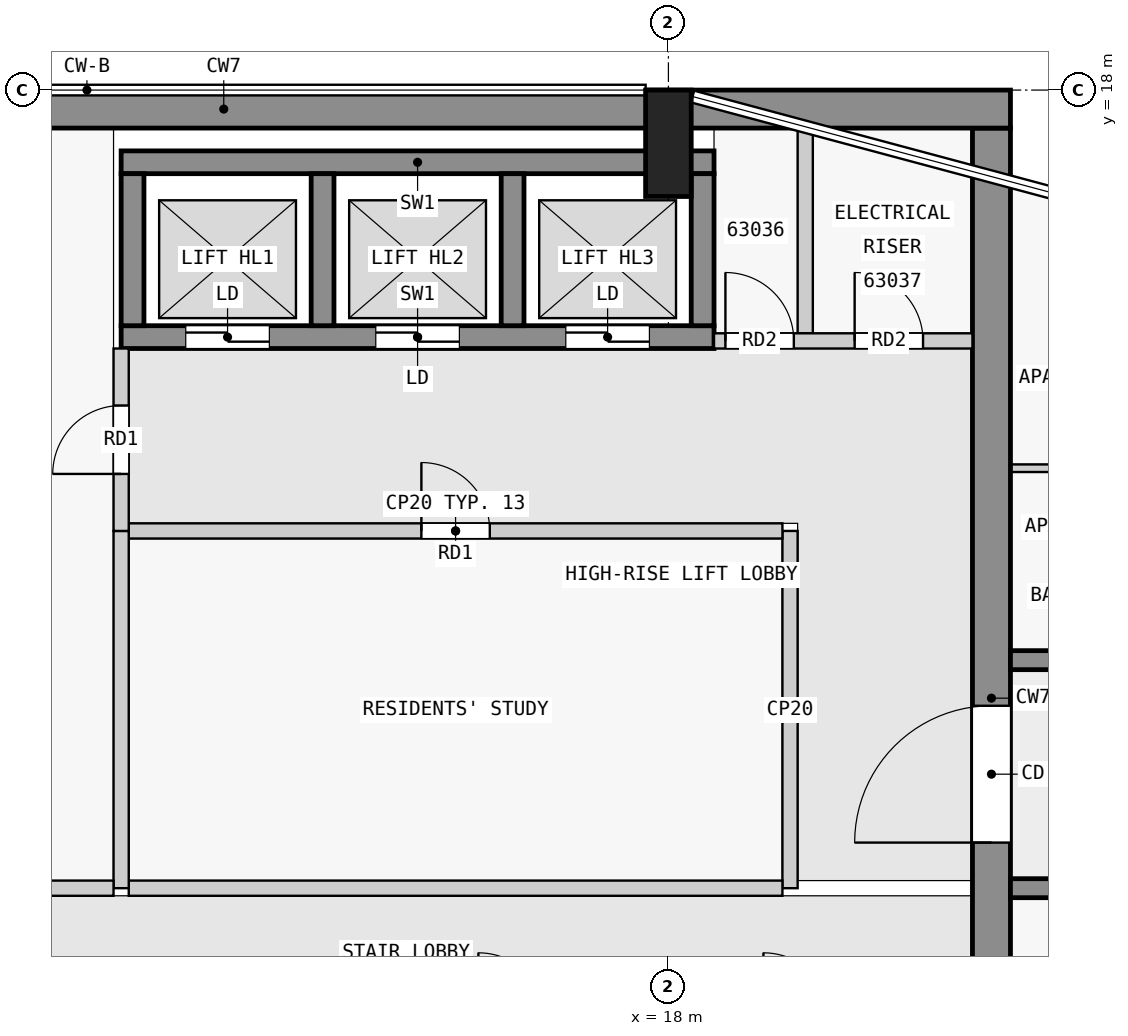
"""IFC4 building model, lengths in metres.
Left out: names, types, materials, properties, quantities, classifications, styles, units other than length and angle.
Written with IfcOpenShell. Run it as: python <this file> out.ifc"""

import sys

from ifc_helpers import new_model, si_unit, direction, frame, frame_2d, origin, origin_2d, place, context, subcontext, project, spatial, rectangle, extrude, element, fill, save


model = new_model("IFC4")
c1 = context("Model", 3, precision=1e-05, world=origin(), true_north=direction((0.0, 1.0)))
c2 = subcontext(c1, "Body", "Model", "MODEL_VIEW")
j1 = project(units=[si_unit("LENGTHUNIT", "METRE"), si_unit("PLANEANGLEUNIT", "RADIAN")], contexts=[c1])
p1 = place(None, origin())
s1 = spatial("IfcSite", under=j1, at=p1, CompositionType="ELEMENT")
p2 = place(p1, origin())
s2 = spatial("IfcBuilding", under=s1, at=p2, CompositionType="ELEMENT")
p3 = place(p2, frame((0.0, 0.0, 242.4)))
s3 = spatial("IfcBuildingStorey", under=s2, at=p3, CompositionType="ELEMENT", Elevation=242.4)
p4 = place(p3, frame((18.0, 17.3, 0.0), z_axis=(0.0, 0.0, 1.0), x_axis=(1.0, 0.0, 0.0)))
e1 = element("IfcColumn", 1, at=p4, inside=s3, PredefinedType="COLUMN", context=c2, shape_type="SweptSolid", body=[
    extrude(rectangle(XDim=0.6, YDim=1.4, at=origin_2d()), origin(), (0.0, 0.0, 1.0), 3.5),
])
p5 = place(p3, frame((1.8, 17.75, 0.0), z_axis=(0.0, 0.0, 1.0), x_axis=(1.0, 0.0, 0.0)))
e2 = element("IfcWall", 2, at=p5, inside=s3, PredefinedType="SHEAR", context=c2, shape_type="SweptSolid", body=[
    extrude(rectangle(XDim=20.7, YDim=0.5, at=frame_2d((10.35, 0.0))), origin(), (0.0, 0.0, 1.0), 3.25),
])
p6 = place(p3, frame((22.25, 2.5, 0.0), z_axis=(0.0, 0.0, 1.0), x_axis=(0.0, 1.0, 0.0)))
e3 = element("IfcWall", 3, at=p6, inside=s3, PredefinedType="SHEAR", context=c2, shape_type="SweptSolid", body=[
    extrude(rectangle(XDim=15.0, YDim=0.5, at=frame_2d((7.5, 0.0))), origin(), (0.0, 0.0, 1.0), 3.25),
])
p7 = place(p6, frame((5.6, 0.0, 0.0)))
e4 = element("IfcOpeningElement", 4, at=p7, cuts=e3, PredefinedType="OPENING", context=c2, shape_type="SweptSolid", body=[
    extrude(rectangle(XDim=1.8, YDim=2.1, at=frame_2d((0.9, 1.05))), frame((0.0, 0.26, 0.0), z_axis=(0.0, -1.0, 0.0), x_axis=(1.0, 0.0, 0.0)), (0.0, 0.0, 1.0), 0.52),
])
p8 = place(p3, frame((10.8, 17.05, 0.0), z_axis=(0.0, 0.0, 1.0), x_axis=(1.0, 0.0, 0.0)))
e5 = element("IfcWall", 5, at=p8, inside=s3, PredefinedType="SHEAR", context=c2, shape_type="SweptSolid", body=[
    extrude(rectangle(XDim=7.8, YDim=0.3, at=frame_2d((3.9, 0.0))), origin(), (0.0, 0.0, 1.0), 3.25),
])
p9 = place(p3, frame((10.8, 14.75, 0.0), z_axis=(0.0, 0.0, 1.0), x_axis=(1.0, 0.0, 0.0)))
e6 = element("IfcWall", 6, at=p9, inside=s3, PredefinedType="SHEAR", context=c2, shape_type="SweptSolid", body=[
    extrude(rectangle(XDim=7.8, YDim=0.3, at=frame_2d((3.9, 0.0))), origin(), (0.0, 0.0, 1.0), 3.25),
])
p10 = place(p9, frame((0.85, 0.0, 0.0)))
e7 = element("IfcOpeningElement", 7, at=p10, cuts=e6, PredefinedType="OPENING", context=c2, shape_type="SweptSolid", body=[
    extrude(rectangle(XDim=1.1, YDim=2.1, at=frame_2d((0.55, 1.05))), frame((0.0, 0.16, 0.0), z_axis=(0.0, -1.0, 0.0), x_axis=(1.0, 0.0, 0.0)), (0.0, 0.0, 1.0), 0.32),
])
p11 = place(p9, frame((3.35, 0.0, 0.0)))
e8 = element("IfcOpeningElement", 8, at=p11, cuts=e6, PredefinedType="OPENING", context=c2, shape_type="SweptSolid", body=[
    extrude(rectangle(XDim=1.1, YDim=2.1, at=frame_2d((0.55, 1.05))), frame((0.0, 0.16, 0.0), z_axis=(0.0, -1.0, 0.0), x_axis=(1.0, 0.0, 0.0)), (0.0, 0.0, 1.0), 0.32),
])
p12 = place(p9, frame((5.85, 0.0, 0.0)))
e9 = element("IfcOpeningElement", 9, at=p12, cuts=e6, PredefinedType="OPENING", context=c2, shape_type="SweptSolid", body=[
    extrude(rectangle(XDim=1.1, YDim=2.1, at=frame_2d((0.55, 1.05))), frame((0.0, 0.16, 0.0), z_axis=(0.0, -1.0, 0.0), x_axis=(1.0, 0.0, 0.0)), (0.0, 0.0, 1.0), 0.32),
])
for number, where, z_axis, x_axis in (
    (10, (10.95, 14.9, 0.0), (0.0, 0.0, 1.0), (0.0, 1.0, 0.0)),
    (11, (13.45, 14.9, 0.0), (0.0, 0.0, 1.0), (0.0, 1.0, 0.0)),
    (12, (15.95, 14.9, 0.0), (0.0, 0.0, 1.0), (0.0, 1.0, 0.0)),
    (13, (18.45, 14.9, 0.0), (0.0, 0.0, 1.0), (0.0, 1.0, 0.0)),
):
    element("IfcWall", number, at=place(p3, frame(where, z_axis=z_axis, x_axis=x_axis)), inside=s3, PredefinedType="SHEAR", context=c2, shape_type="SweptSolid", body=[
        extrude(rectangle(XDim=2.0, YDim=0.3, at=frame_2d((1.0, 0.0))), origin(), (0.0, 0.0, 1.0), 3.25),
    ])
p13 = place(p3, frame((22.5, 7.5, 0.0), z_axis=(0.0, 0.0, 1.0), x_axis=(1.0, 0.0, 0.0)))
e14 = element("IfcWall", 14, at=p13, inside=s3, PredefinedType="SHEAR", context=c2, shape_type="SweptSolid", body=[
    extrude(rectangle(XDim=22.5, YDim=0.25, at=frame_2d((11.25, 0.0))), origin(), (0.0, 0.0, 1.0), 3.25),
])
p14 = place(p13, frame((1.75, 0.0, 0.0)))
e15 = element("IfcOpeningElement", 15, at=p14, cuts=e14, PredefinedType="OPENING", context=c2, shape_type="SweptSolid", body=[
    extrude(rectangle(XDim=1.0, YDim=2.1, at=frame_2d((0.5, 1.05))), frame((0.0, 0.135, 0.0), z_axis=(0.0, -1.0, 0.0), x_axis=(1.0, 0.0, 0.0)), (0.0, 0.0, 1.0), 0.27),
])
p15 = place(p13, frame((5.85, 0.0, 0.0)))
e16 = element("IfcOpeningElement", 16, at=p15, cuts=e14, PredefinedType="OPENING", context=c2, shape_type="SweptSolid", body=[
    extrude(rectangle(XDim=1.8, YDim=2.1, at=frame_2d((0.9, 1.05))), frame((0.0, 0.135, 0.0), z_axis=(0.0, -1.0, 0.0), x_axis=(1.0, 0.0, 0.0)), (0.0, 0.0, 1.0), 0.27),
])
p16 = place(p13, frame((13.05, 0.0, 0.0)))
e17 = element("IfcOpeningElement", 17, at=p16, cuts=e14, PredefinedType="OPENING", context=c2, shape_type="SweptSolid", body=[
    extrude(rectangle(XDim=1.0, YDim=2.1, at=frame_2d((0.5, 1.05))), frame((0.0, 0.135, 0.0), z_axis=(0.0, -1.0, 0.0), x_axis=(1.0, 0.0, 0.0)), (0.0, 0.0, 1.0), 0.27),
])
p17 = place(p13, frame((18.75, 0.0, 0.0)))
e18 = element("IfcOpeningElement", 18, at=p17, cuts=e14, PredefinedType="OPENING", context=c2, shape_type="SweptSolid", body=[
    extrude(rectangle(XDim=0.9, YDim=2.1, at=frame_2d((0.45, 1.05))), frame((0.0, 0.135, 0.0), z_axis=(0.0, -1.0, 0.0), x_axis=(1.0, 0.0, 0.0)), (0.0, 0.0, 1.0), 0.27),
])
p18 = place(p13, frame((20.95, 0.0, 0.0)))
e19 = element("IfcOpeningElement", 19, at=p18, cuts=e14, PredefinedType="OPENING", context=c2, shape_type="SweptSolid", body=[
    extrude(rectangle(XDim=1.0, YDim=2.1, at=frame_2d((0.5, 1.05))), frame((0.0, 0.135, 0.0), z_axis=(0.0, -1.0, 0.0), x_axis=(1.0, 0.0, 0.0)), (0.0, 0.0, 1.0), 0.27),
])
p19 = place(p3, frame((22.5, 10.5, 0.0), z_axis=(0.0, 0.0, 1.0), x_axis=(1.0, 0.0, 0.0)))
e20 = element("IfcWall", 20, at=p19, inside=s3, PredefinedType="SHEAR", context=c2, shape_type="SweptSolid", body=[
    extrude(rectangle(XDim=22.5, YDim=0.25, at=frame_2d((11.25, 0.0))), origin(), (0.0, 0.0, 1.0), 3.25),
])
p20 = place(p19, frame((4.05, 0.0, 0.0)))
e21 = element("IfcOpeningElement", 21, at=p20, cuts=e20, PredefinedType="OPENING", context=c2, shape_type="SweptSolid", body=[
    extrude(rectangle(XDim=1.0, YDim=2.1, at=frame_2d((0.5, 1.05))), frame((0.0, 0.135, 0.0), z_axis=(0.0, -1.0, 0.0), x_axis=(1.0, 0.0, 0.0)), (0.0, 0.0, 1.0), 0.27),
])
p21 = place(p19, frame((10.75, 0.0, 0.0)))
e22 = element("IfcOpeningElement", 22, at=p21, cuts=e20, PredefinedType="OPENING", context=c2, shape_type="SweptSolid", body=[
    extrude(rectangle(XDim=1.0, YDim=2.1, at=frame_2d((0.5, 1.05))), frame((0.0, 0.135, 0.0), z_axis=(0.0, -1.0, 0.0), x_axis=(1.0, 0.0, 0.0)), (0.0, 0.0, 1.0), 0.27),
])
p22 = place(p19, frame((16.85, 0.0, 0.0)))
e23 = element("IfcOpeningElement", 23, at=p22, cuts=e20, PredefinedType="OPENING", context=c2, shape_type="SweptSolid", body=[
    extrude(rectangle(XDim=1.0, YDim=2.1, at=frame_2d((0.5, 1.05))), frame((0.0, 0.135, 0.0), z_axis=(0.0, -1.0, 0.0), x_axis=(1.0, 0.0, 0.0)), (0.0, 0.0, 1.0), 0.27),
])
p23 = place(p3, frame((7.1, 7.5, 0.0), z_axis=(0.0, 0.0, 1.0), x_axis=(1.0, 0.0, 0.0)))
e24 = element("IfcWall", 24, at=p23, inside=s3, PredefinedType="PARTITIONING", context=c2, shape_type="SweptSolid", body=[
    extrude(rectangle(XDim=3.6, YDim=0.2, at=frame_2d((1.8, 0.0))), origin(), (0.0, 0.0, 1.0), 3.25),
])
p24 = place(p3, frame((10.8, 12.2, 0.0), z_axis=(0.0, 0.0, 1.0), x_axis=(0.0, 1.0, 0.0)))
e25 = element("IfcWall", 25, at=p24, inside=s3, PredefinedType="PARTITIONING", context=c2, shape_type="SweptSolid", body=[
    extrude(rectangle(XDim=2.4, YDim=0.2, at=frame_2d((1.2, 0.0))), origin(), (0.0, 0.0, 1.0), 3.25),
])
p25 = place(p24, frame((0.75, 0.0, 0.0)))
e26 = element("IfcOpeningElement", 26, at=p25, cuts=e25, PredefinedType="OPENING", context=c2, shape_type="SweptSolid", body=[
    extrude(rectangle(XDim=0.9, YDim=2.1, at=frame_2d((0.45, 1.05))), frame((0.0, 0.11, 0.0), z_axis=(0.0, -1.0, 0.0), x_axis=(1.0, 0.0, 0.0)), (0.0, 0.0, 1.0), 0.22),
])
p26 = place(p3, frame((10.8, 7.5, 0.0), z_axis=(0.0, 0.0, 1.0), x_axis=(0.0, 1.0, 0.0)))
e27 = element("IfcWall", 27, at=p26, inside=s3, PredefinedType="PARTITIONING", context=c2, shape_type="SweptSolid", body=[
    extrude(rectangle(XDim=4.7, YDim=0.2, at=frame_2d((2.35, 0.0))), origin(), (0.0, 0.0, 1.0), 3.25),
])
p27 = place(p3, frame((10.9, 7.5, 0.0), z_axis=(0.0, 0.0, 1.0), x_axis=(1.0, 0.0, 0.0)))
e28 = element("IfcWall", 28, at=p27, inside=s3, PredefinedType="PARTITIONING", context=c2, shape_type="SweptSolid", body=[
    extrude(rectangle(XDim=8.6, YDim=0.2, at=frame_2d((4.3, 0.0))), origin(), (0.0, 0.0, 1.0), 3.25),
])
p28 = place(p3, frame((19.6, 7.5, 0.0), z_axis=(0.0, 0.0, 1.0), x_axis=(0.0, 1.0, 0.0)))
e29 = element("IfcWall", 29, at=p28, inside=s3, PredefinedType="PARTITIONING", context=c2, shape_type="SweptSolid", body=[
    extrude(rectangle(XDim=4.7, YDim=0.2, at=frame_2d((2.35, 0.0))), origin(), (0.0, 0.0, 1.0), 3.25),
])
p29 = place(p3, frame((10.9, 12.2, 0.0), z_axis=(0.0, 0.0, 1.0), x_axis=(1.0, 0.0, 0.0)))
e30 = element("IfcWall", 30, at=p29, inside=s3, PredefinedType="PARTITIONING", context=c2, shape_type="SweptSolid", body=[
    extrude(rectangle(XDim=8.6, YDim=0.2, at=frame_2d((4.3, 0.0))), origin(), (0.0, 0.0, 1.0), 3.25),
])
p30 = place(p29, frame((3.85, 0.0, 0.0)))
e31 = element("IfcOpeningElement", 31, at=p30, cuts=e30, PredefinedType="OPENING", context=c2, shape_type="SweptSolid", body=[
    extrude(rectangle(XDim=0.9, YDim=2.1, at=frame_2d((0.45, 1.05))), frame((0.0, 0.11, 0.0), z_axis=(0.0, -1.0, 0.0), x_axis=(1.0, 0.0, 0.0)), (0.0, 0.0, 1.0), 0.22),
])
p31 = place(p3, frame((18.6, 14.7, 0.0), z_axis=(0.0, 0.0, 1.0), x_axis=(1.0, 0.0, 0.0)))
e32 = element("IfcWall", 32, at=p31, inside=s3, PredefinedType="PARTITIONING", context=c2, shape_type="SweptSolid", body=[
    extrude(rectangle(XDim=3.4, YDim=0.2, at=frame_2d((1.7, 0.0))), origin(), (0.0, 0.0, 1.0), 3.25),
])
p32 = place(p31, frame((0.15, 0.0, 0.0)))
e33 = element("IfcOpeningElement", 33, at=p32, cuts=e32, PredefinedType="OPENING", context=c2, shape_type="SweptSolid", body=[
    extrude(rectangle(XDim=0.9, YDim=2.1, at=frame_2d((0.45, 1.05))), frame((0.0, 0.11, 0.0), z_axis=(0.0, -1.0, 0.0), x_axis=(1.0, 0.0, 0.0)), (0.0, 0.0, 1.0), 0.22),
])
p33 = place(p31, frame((1.85, 0.0, 0.0)))
e34 = element("IfcOpeningElement", 34, at=p33, cuts=e32, PredefinedType="OPENING", context=c2, shape_type="SweptSolid", body=[
    extrude(rectangle(XDim=0.9, YDim=2.1, at=frame_2d((0.45, 1.05))), frame((0.0, 0.11, 0.0), z_axis=(0.0, -1.0, 0.0), x_axis=(1.0, 0.0, 0.0)), (0.0, 0.0, 1.0), 0.22),
])
p34 = place(p3, frame((19.8, 14.8, 0.0), z_axis=(0.0, 0.0, 1.0), x_axis=(0.0, 1.0, 0.0)))
e35 = element("IfcWall", 35, at=p34, inside=s3, PredefinedType="PARTITIONING", context=c2, shape_type="SweptSolid", body=[
    extrude(rectangle(XDim=2.7, YDim=0.2, at=frame_2d((1.35, 0.0))), origin(), (0.0, 0.0, 1.0), 3.25),
])
p35 = place(p3, frame((24.25, 13.025, 0.0), z_axis=(0.0, 0.0, 1.0), x_axis=(-1.0, 0.0, 0.0)))
e36 = element("IfcWall", 36, at=p35, inside=s3, PredefinedType="PARTITIONING", context=c2, shape_type="SweptSolid", body=[
    extrude(rectangle(XDim=1.75, YDim=0.1, at=frame_2d((0.875, 0.0))), origin(), (0.0, 0.0, 1.0), 3.25),
])
p36 = place(p25, origin())
e37 = element("IfcDoor", 37, at=p36, inside=s3, OperationType="SINGLE_SWING_LEFT", PredefinedType="DOOR", context=c2, shape_type="SweptSolid", body=[
    extrude(rectangle(XDim=0.9, YDim=2.1, at=frame_2d((0.45, 1.05))), frame((0.0, 0.025, 0.0), z_axis=(0.0, -1.0, 0.0), x_axis=(1.0, 0.0, 0.0)), (0.0, 0.0, 1.0), 0.05),
])
fill(e26, e37)
p37 = place(p30, origin())
e38 = element("IfcDoor", 38, at=p37, inside=s3, OperationType="SINGLE_SWING_LEFT", PredefinedType="DOOR", context=c2, shape_type="SweptSolid", body=[
    extrude(rectangle(XDim=0.9, YDim=2.1, at=frame_2d((0.45, 1.05))), frame((0.0, 0.025, 0.0), z_axis=(0.0, -1.0, 0.0), x_axis=(1.0, 0.0, 0.0)), (0.0, 0.0, 1.0), 0.05),
])
fill(e31, e38)
p38 = place(p10, origin())
e39 = element("IfcDoor", 39, at=p38, inside=s3, OperationType="DOUBLE_DOOR_SLIDING", PredefinedType="DOOR", context=c2, shape_type="SweptSolid", body=[
    extrude(rectangle(XDim=1.1, YDim=2.1, at=frame_2d((0.55, 1.05))), frame((0.0, 0.025, 0.0), z_axis=(0.0, -1.0, 0.0), x_axis=(1.0, 0.0, 0.0)), (0.0, 0.0, 1.0), 0.05),
])
fill(e7, e39)
p39 = place(p11, origin())
e40 = element("IfcDoor", 40, at=p39, inside=s3, OperationType="DOUBLE_DOOR_SLIDING", PredefinedType="DOOR", context=c2, shape_type="SweptSolid", body=[
    extrude(rectangle(XDim=1.1, YDim=2.1, at=frame_2d((0.55, 1.05))), frame((0.0, 0.025, 0.0), z_axis=(0.0, -1.0, 0.0), x_axis=(1.0, 0.0, 0.0)), (0.0, 0.0, 1.0), 0.05),
])
fill(e8, e40)
p40 = place(p12, origin())
e41 = element("IfcDoor", 41, at=p40, inside=s3, OperationType="DOUBLE_DOOR_SLIDING", PredefinedType="DOOR", context=c2, shape_type="SweptSolid", body=[
    extrude(rectangle(XDim=1.1, YDim=2.1, at=frame_2d((0.55, 1.05))), frame((0.0, 0.025, 0.0), z_axis=(0.0, -1.0, 0.0), x_axis=(1.0, 0.0, 0.0)), (0.0, 0.0, 1.0), 0.05),
])
fill(e9, e41)
p41 = place(p7, origin())
e42 = element("IfcDoor", 42, at=p41, inside=s3, OperationType="DOUBLE_DOOR_SINGLE_SWING", PredefinedType="DOOR", context=c2, shape_type="SweptSolid", body=[
    extrude(rectangle(XDim=1.8, YDim=2.1, at=frame_2d((0.9, 1.05))), frame((0.0, 0.025, 0.0), z_axis=(0.0, -1.0, 0.0), x_axis=(1.0, 0.0, 0.0)), (0.0, 0.0, 1.0), 0.05),
])
fill(e4, e42)
p42 = place(p32, origin())
e43 = element("IfcDoor", 43, at=p42, inside=s3, OperationType="SINGLE_SWING_LEFT", PredefinedType="DOOR", context=c2, shape_type="SweptSolid", body=[
    extrude(rectangle(XDim=0.9, YDim=2.1, at=frame_2d((0.45, 1.05))), frame((0.0, 0.025, 0.0), z_axis=(0.0, -1.0, 0.0), x_axis=(1.0, 0.0, 0.0)), (0.0, 0.0, 1.0), 0.05),
])
fill(e33, e43)
p43 = place(p33, origin())
e44 = element("IfcDoor", 44, at=p43, inside=s3, OperationType="SINGLE_SWING_LEFT", PredefinedType="DOOR", context=c2, shape_type="SweptSolid", body=[
    extrude(rectangle(XDim=0.9, YDim=2.1, at=frame_2d((0.45, 1.05))), frame((0.0, 0.025, 0.0), z_axis=(0.0, -1.0, 0.0), x_axis=(1.0, 0.0, 0.0)), (0.0, 0.0, 1.0), 0.05),
])
fill(e34, e44)
save(model, sys.argv[1])
